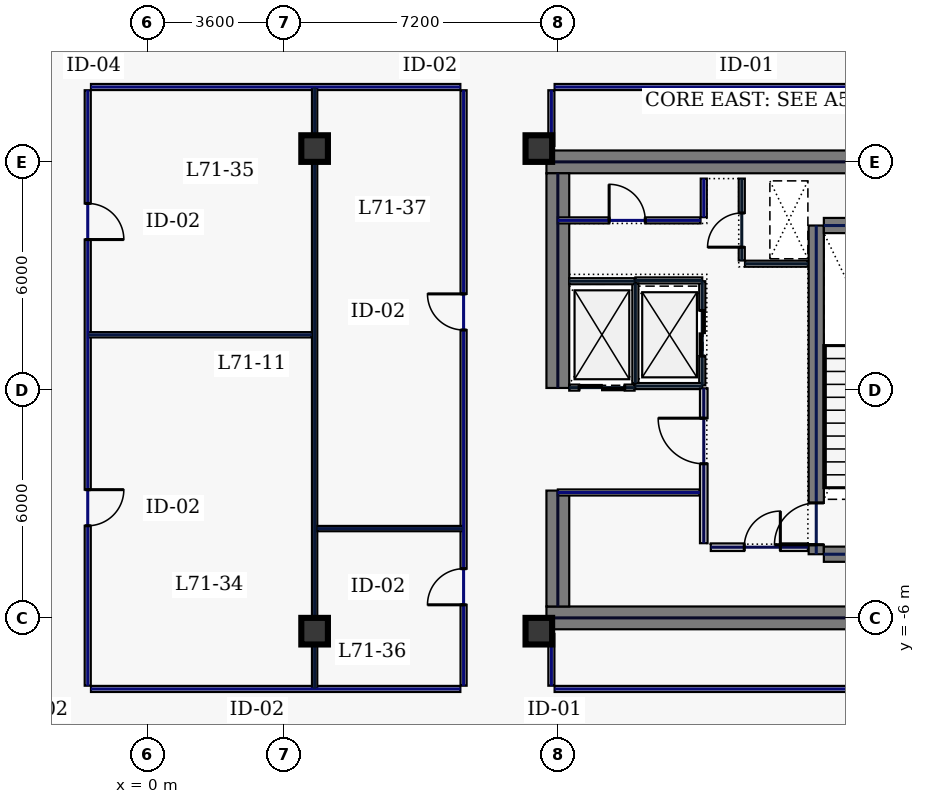
"""IFC4 building model, lengths in metres.
Left out: names, types, materials, properties, quantities, classifications, styles, units other than length and angle.
Written with IfcOpenShell. Run it as: python <this file> out.ifc"""

import sys

from ifc_helpers import new_model, si_unit, direction, frame, frame_2d, origin, origin_2d, place, context, subcontext, project, spatial, rectangle, hollow_rectangle, extrude, element, fill, save


model = new_model("IFC4")
c1 = context("Model", 3, precision=1e-05, world=origin(), true_north=direction((0.0, 1.0)))
c2 = subcontext(c1, "Body", "Model", "MODEL_VIEW")
j1 = project(units=[si_unit("LENGTHUNIT", "METRE"), si_unit("PLANEANGLEUNIT", "RADIAN")], contexts=[c1])
p1 = place(None, origin())
s1 = spatial("IfcSite", under=j1, at=p1, CompositionType="ELEMENT")
p2 = place(p1, origin())
s2 = spatial("IfcBuilding", under=s1, at=p2, CompositionType="ELEMENT")
p3 = place(p2, frame((0.0, 0.0, 305.0)))
s3 = spatial("IfcBuildingStorey", under=s2, at=p3, CompositionType="ELEMENT", Elevation=305.0)
for number, where, z_axis, x_axis in (
    (1, (10.5, 6.0, 0.0), (0.0, 0.0, 1.0), (1.0, 0.0, 0.0)),
    (2, (10.5, -6.0, 0.0), (0.0, 0.0, 1.0), (1.0, 0.0, 0.0)),
):
    element("IfcWall", number, at=place(p3, frame(where, z_axis=z_axis, x_axis=x_axis)), inside=s3, PredefinedType="SHEAR", context=c2, shape_type="SweptSolid", body=[
        extrude(rectangle(XDim=11.5, YDim=0.6, at=frame_2d((5.75, 0.0))), origin(), (0.0, 0.0, 1.0), 3.74),
    ])
p4 = place(p3, frame((10.8, -5.7, 0.0), z_axis=(0.0, 0.0, 1.0), x_axis=(0.0, 1.0, 0.0)))
e3 = element("IfcWall", 3, at=p4, inside=s3, PredefinedType="SHEAR", context=c2, shape_type="SweptSolid", body=[
    extrude(rectangle(XDim=3.05, YDim=0.6, at=frame_2d((1.525, 0.0))), origin(), (0.0, 0.0, 1.0), 3.74),
])
p5 = place(p3, frame((10.8, 0.05, 0.0), z_axis=(0.0, 0.0, 1.0), x_axis=(0.0, 1.0, 0.0)))
e4 = element("IfcWall", 4, at=p5, inside=s3, PredefinedType="SHEAR", context=c2, shape_type="SweptSolid", body=[
    extrude(rectangle(XDim=5.65, YDim=0.6, at=frame_2d((2.825, 0.0))), origin(), (0.0, 0.0, 1.0), 3.74),
])
p6 = place(p3, frame((17.6, -4.325, 0.0), z_axis=(0.0, 0.0, 1.0), x_axis=(0.0, 1.0, 0.0)))
e5 = element("IfcWall", 5, at=p6, inside=s3, PredefinedType="SHEAR", context=c2, shape_type="SweptSolid", body=[
    extrude(rectangle(XDim=8.65, YDim=0.4, at=frame_2d((4.325, 0.0))), origin(), (0.0, 0.0, 1.0), 3.74),
])
p7 = place(p6, frame((0.25, 0.0, 0.0)))
e6 = element("IfcOpeningElement", 6, at=p7, cuts=e5, PredefinedType="OPENING", context=c2, shape_type="SweptSolid", body=[
    extrude(rectangle(XDim=1.1, YDim=2.2, at=frame_2d((0.55, 1.1))), frame((0.0, 0.21, 0.0), z_axis=(0.0, -1.0, 0.0), x_axis=(1.0, 0.0, 0.0)), (0.0, 0.0, 1.0), 0.42),
])
for number, where, z_axis, x_axis in (
    (7, (17.8, -4.325, 0.0), (0.0, 0.0, 1.0), (1.0, 0.0, 0.0)),
    (8, (17.8, 4.325, 0.0), (0.0, 0.0, 1.0), (1.0, 0.0, 0.0)),
):
    element("IfcWall", number, at=place(p3, frame(where, z_axis=z_axis, x_axis=x_axis)), inside=s3, PredefinedType="SHEAR", context=c2, shape_type="SweptSolid", body=[
        extrude(rectangle(XDim=3.4, YDim=0.4, at=frame_2d((1.7, 0.0))), origin(), (0.0, 0.0, 1.0), 3.74),
    ])
for number, where, z_axis, x_axis in (
    (9, (10.3, -6.35, 0.0), (0.0, 0.0, 1.0), (1.0, 0.0, 0.0)),
    (10, (10.3, 6.35, 0.0), (0.0, 0.0, 1.0), (1.0, 0.0, 0.0)),
    (11, (4.4, -6.35, 0.0), (0.0, 0.0, 1.0), (1.0, 0.0, 0.0)),
    (12, (4.4, 6.35, 0.0), (0.0, 0.0, 1.0), (1.0, 0.0, 0.0)),
):
    element("IfcColumn", number, at=place(p3, frame(where, z_axis=z_axis, x_axis=x_axis)), inside=s3, PredefinedType="COLUMN", context=c2, shape_type="SweptSolid", body=[
        extrude(hollow_rectangle(XDim=0.7, YDim=0.7, WallThickness=0.032, at=origin_2d()), origin(), (0.0, 0.0, 1.0), 3.74),
    ])
p8 = place(p3, frame((14.6, 0.12, 0.0), z_axis=(0.0, 0.0, 1.0), x_axis=(0.0, 1.0, 0.0)))
e13 = element("IfcWall", 13, at=p8, inside=s3, PredefinedType="PARTITIONING", context=c2, shape_type="SweptSolid", body=[
    extrude(rectangle(XDim=2.74, YDim=0.16, at=frame_2d((1.37, 0.0))), origin(), (0.0, 0.0, 1.0), 3.74),
])
p9 = place(p8, frame((0.77, 0.0, 0.0)))
e14 = element("IfcOpeningElement", 14, at=p9, cuts=e13, PredefinedType="OPENING", context=c2, shape_type="SweptSolid", body=[
    extrude(rectangle(XDim=1.2, YDim=2.2, at=frame_2d((0.6, 1.1))), frame((0.0, 0.09, 0.0), z_axis=(0.0, -1.0, 0.0), x_axis=(1.0, 0.0, 0.0)), (0.0, 0.0, 1.0), 0.18),
])
for number, where, z_axis, x_axis in (
    (15, (12.84, 0.1, 0.0), (0.0, 0.0, 1.0), (1.0, 0.0, 0.0)),
    (16, (12.84, 2.88, 0.0), (0.0, 0.0, 1.0), (1.0, 0.0, 0.0)),
):
    element("IfcWall", number, at=place(p3, frame(where, z_axis=z_axis, x_axis=x_axis)), inside=s3, PredefinedType="PARTITIONING", context=c2, shape_type="SweptSolid", body=[
        extrude(rectangle(XDim=1.76, YDim=0.16, at=frame_2d((0.88, 0.0))), origin(), (0.0, 0.0, 1.0), 3.74),
    ])
p10 = place(p3, frame((12.84, 0.18, 0.0), z_axis=(0.0, 0.0, 1.0), x_axis=(0.0, 1.0, 0.0)))
e17 = element("IfcWall", 17, at=p10, inside=s3, PredefinedType="PARTITIONING", context=c2, shape_type="SweptSolid", body=[
    extrude(rectangle(XDim=2.62, YDim=0.16, at=frame_2d((1.31, 0.0))), origin(), (0.0, 0.0, 1.0), 3.74),
])
p11 = place(p3, frame((11.1, 0.06, 0.0), z_axis=(0.0, 0.0, 1.0), x_axis=(1.0, 0.0, 0.0)))
e18 = element("IfcWall", 18, at=p11, inside=s3, PredefinedType="PARTITIONING", context=c2, shape_type="SweptSolid", body=[
    extrude(rectangle(XDim=1.72, YDim=0.16, at=frame_2d((0.86, 0.0))), origin(), (0.0, 0.0, 1.0), 3.74),
])
p12 = place(p11, frame((0.26, 0.0, 0.0)))
e19 = element("IfcOpeningElement", 19, at=p12, cuts=e18, PredefinedType="OPENING", context=c2, shape_type="SweptSolid", body=[
    extrude(rectangle(XDim=1.2, YDim=2.2, at=frame_2d((0.6, 1.1))), frame((0.0, 0.09, 0.0), z_axis=(0.0, -1.0, 0.0), x_axis=(1.0, 0.0, 0.0)), (0.0, 0.0, 1.0), 0.18),
])
p13 = place(p3, frame((11.1, 2.86, 0.0), z_axis=(0.0, 0.0, 1.0), x_axis=(1.0, 0.0, 0.0)))
e20 = element("IfcWall", 20, at=p13, inside=s3, PredefinedType="PARTITIONING", context=c2, shape_type="SweptSolid", body=[
    extrude(rectangle(XDim=1.72, YDim=0.16, at=frame_2d((0.86, 0.0))), origin(), (0.0, 0.0, 1.0), 3.74),
])
p14 = place(p3, frame((15.64, 3.405, 0.0), z_axis=(0.0, 0.0, 1.0), x_axis=(0.0, 1.0, 0.0)))
e21 = element("IfcWall", 21, at=p14, inside=s3, PredefinedType="PARTITIONING", context=c2, shape_type="SweptSolid", body=[
    extrude(rectangle(XDim=2.155, YDim=0.16, at=frame_2d((1.078, 0.0))), origin(), (0.0, 0.0, 1.0), 3.74),
])
p15 = place(p14, frame((0.35, 0.0, 0.0)))
e22 = element("IfcOpeningElement", 22, at=p15, cuts=e21, PredefinedType="OPENING", context=c2, shape_type="SweptSolid", body=[
    extrude(rectangle(XDim=0.9, YDim=2.2, at=frame_2d((0.45, 1.1))), frame((0.0, 0.09, 0.0), z_axis=(0.0, -1.0, 0.0), x_axis=(1.0, 0.0, 0.0)), (0.0, 0.0, 1.0), 0.18),
])
p16 = place(p3, frame((15.725, 3.32, 0.0), z_axis=(0.0, 0.0, 1.0), x_axis=(1.0, 0.0, 0.0)))
e23 = element("IfcWall", 23, at=p16, inside=s3, PredefinedType="PARTITIONING", context=c2, shape_type="SweptSolid", body=[
    extrude(rectangle(XDim=1.655, YDim=0.16, at=frame_2d((0.827, 0.0))), origin(), (0.0, 0.0, 1.0), 3.74),
])
p17 = place(p3, frame((14.825, -4.14, 0.0), z_axis=(0.0, 0.0, 1.0), x_axis=(1.0, 0.0, 0.0)))
e24 = element("IfcWall", 24, at=p17, inside=s3, PredefinedType="SOLIDWALL", context=c2, shape_type="SweptSolid", body=[
    extrude(rectangle(XDim=2.555, YDim=0.2, at=frame_2d((1.277, 0.0))), origin(), (0.0, 0.0, 1.0), 3.74),
])
p18 = place(p17, frame((0.88, 0.0, 0.0)))
e25 = element("IfcOpeningElement", 25, at=p18, cuts=e24, PredefinedType="OPENING", context=c2, shape_type="SweptSolid", body=[
    extrude(rectangle(XDim=0.95, YDim=2.2, at=frame_2d((0.475, 1.1))), frame((0.0, 0.11, 0.0), z_axis=(0.0, -1.0, 0.0), x_axis=(1.0, 0.0, 0.0)), (0.0, 0.0, 1.0), 0.22),
])
p19 = place(p3, frame((10.8, -2.7, 0.0), z_axis=(0.0, 0.0, 1.0), x_axis=(1.0, 0.0, 0.0)))
e26 = element("IfcWall", 26, at=p19, inside=s3, PredefinedType="PARTITIONING", context=c2, shape_type="SweptSolid", body=[
    extrude(rectangle(XDim=3.735, YDim=0.16, at=frame_2d((1.867, 0.0))), origin(), (0.0, 0.0, 1.0), 3.74),
])
p20 = place(p3, frame((10.8, 4.46, 0.0), z_axis=(0.0, 0.0, 1.0), x_axis=(1.0, 0.0, 0.0)))
e27 = element("IfcWall", 27, at=p20, inside=s3, PredefinedType="PARTITIONING", context=c2, shape_type="SweptSolid", body=[
    extrude(rectangle(XDim=3.755, YDim=0.16, at=frame_2d((1.877, 0.0))), origin(), (0.0, 0.0, 1.0), 3.74),
])
p21 = place(p20, frame((1.35, 0.0, 0.0)))
e28 = element("IfcOpeningElement", 28, at=p21, cuts=e27, PredefinedType="OPENING", context=c2, shape_type="SweptSolid", body=[
    extrude(rectangle(XDim=0.95, YDim=2.2, at=frame_2d((0.475, 1.1))), frame((0.0, 0.09, 0.0), z_axis=(0.0, -1.0, 0.0), x_axis=(1.0, 0.0, 0.0)), (0.0, 0.0, 1.0), 0.18),
])
p22 = place(p3, frame((14.64, 4.545, 0.0), z_axis=(0.0, 0.0, 1.0), x_axis=(0.0, 1.0, 0.0)))
e29 = element("IfcWall", 29, at=p22, inside=s3, PredefinedType="PARTITIONING", context=c2, shape_type="SweptSolid", body=[
    extrude(rectangle(XDim=1.015, YDim=0.16, at=frame_2d((0.508, 0.0))), origin(), (0.0, 0.0, 1.0), 3.74),
])
p23 = place(p3, frame((14.64, -4.035, 0.0), z_axis=(0.0, 0.0, 1.0), x_axis=(0.0, 1.0, 0.0)))
e30 = element("IfcWall", 30, at=p23, inside=s3, PredefinedType="SOLIDWALL", context=c2, shape_type="SweptSolid", body=[
    extrude(rectangle(XDim=4.075, YDim=0.2, at=frame_2d((2.038, 0.0))), origin(), (0.0, 0.0, 1.0), 3.74),
])
p24 = place(p23, frame((2.09, 0.0, 0.0)))
e31 = element("IfcOpeningElement", 31, at=p24, cuts=e30, PredefinedType="OPENING", context=c2, shape_type="SweptSolid", body=[
    extrude(rectangle(XDim=1.2, YDim=2.2, at=frame_2d((0.6, 1.1))), frame((0.0, 0.11, 0.0), z_axis=(0.0, -1.0, 0.0), x_axis=(1.0, 0.0, 0.0)), (0.0, 0.0, 1.0), 0.22),
])
p25 = place(p3, frame((21.915, 7.97, 0.0), z_axis=(0.0, 0.0, 1.0), x_axis=(-1.0, 0.0, 0.0)))
e32 = element("IfcWall", 32, at=p25, inside=s3, PredefinedType="PARTITIONING", context=c2, shape_type="SweptSolid", body=[
    extrude(rectangle(XDim=11.2, YDim=0.16, at=frame_2d((5.6, 0.0))), origin(), (0.0, 0.0, 1.0), 3.74),
])
p26 = place(p3, frame((10.63, 7.885, 0.0), z_axis=(0.0, 0.0, 1.0), x_axis=(0.0, -1.0, 0.0)))
e33 = element("IfcWall", 33, at=p26, inside=s3, PredefinedType="PARTITIONING", context=c2, shape_type="SweptSolid", body=[
    extrude(rectangle(XDim=1.465, YDim=0.16, at=frame_2d((0.732, 0.0))), origin(), (0.0, 0.0, 1.0), 3.74),
])
p27 = place(p3, frame((10.63, -6.42, 0.0), z_axis=(0.0, 0.0, 1.0), x_axis=(0.0, -1.0, 0.0)))
e34 = element("IfcWall", 34, at=p27, inside=s3, PredefinedType="PARTITIONING", context=c2, shape_type="SweptSolid", body=[
    extrude(rectangle(XDim=1.365, YDim=0.16, at=frame_2d((0.683, 0.0))), origin(), (0.0, 0.0, 1.0), 3.74),
])
p28 = place(p3, frame((10.715, -7.87, 0.0), z_axis=(0.0, 0.0, 1.0), x_axis=(1.0, 0.0, 0.0)))
e35 = element("IfcWall", 35, at=p28, inside=s3, PredefinedType="PARTITIONING", context=c2, shape_type="SweptSolid", body=[
    extrude(rectangle(XDim=11.2, YDim=0.16, at=frame_2d((5.6, 0.0))), origin(), (0.0, 0.0, 1.0), 3.74),
])
p29 = place(p3, frame((8.235, 7.97, 0.0), z_axis=(0.0, 0.0, 1.0), x_axis=(-1.0, 0.0, 0.0)))
e36 = element("IfcWall", 36, at=p29, inside=s3, PredefinedType="PARTITIONING", context=c2, shape_type="SweptSolid", body=[
    extrude(rectangle(XDim=9.72, YDim=0.16, at=frame_2d((4.86, 0.0))), origin(), (0.0, 0.0, 1.0), 3.74),
])
p30 = place(p3, frame((-1.57, 7.885, 0.0), z_axis=(0.0, 0.0, 1.0), x_axis=(0.0, -1.0, 0.0)))
e37 = element("IfcWall", 37, at=p30, inside=s3, PredefinedType="PARTITIONING", context=c2, shape_type="SweptSolid", body=[
    extrude(rectangle(XDim=15.67, YDim=0.16, at=frame_2d((7.835, 0.0))), origin(), (0.0, 0.0, 1.0), 3.74),
])
p31 = place(p30, frame((10.511, 0.0, 0.0)))
e38 = element("IfcOpeningElement", 38, at=p31, cuts=e37, PredefinedType="OPENING", context=c2, shape_type="SweptSolid", body=[
    extrude(rectangle(XDim=0.95, YDim=2.2, at=frame_2d((0.475, 1.1))), frame((0.0, 0.09, 0.0), z_axis=(0.0, -1.0, 0.0), x_axis=(1.0, 0.0, 0.0)), (0.0, 0.0, 1.0), 0.18),
])
p32 = place(p30, frame((2.979, 0.0, 0.0)))
e39 = element("IfcOpeningElement", 39, at=p32, cuts=e37, PredefinedType="OPENING", context=c2, shape_type="SweptSolid", body=[
    extrude(rectangle(XDim=0.95, YDim=2.2, at=frame_2d((0.475, 1.1))), frame((0.0, 0.09, 0.0), z_axis=(0.0, -1.0, 0.0), x_axis=(1.0, 0.0, 0.0)), (0.0, 0.0, 1.0), 0.18),
])
p33 = place(p3, frame((-1.485, -7.87, 0.0), z_axis=(0.0, 0.0, 1.0), x_axis=(1.0, 0.0, 0.0)))
e40 = element("IfcWall", 40, at=p33, inside=s3, PredefinedType="PARTITIONING", context=c2, shape_type="SweptSolid", body=[
    extrude(rectangle(XDim=9.72, YDim=0.16, at=frame_2d((4.86, 0.0))), origin(), (0.0, 0.0, 1.0), 3.74),
])
p34 = place(p3, frame((8.32, -7.785, 0.0), z_axis=(0.0, 0.0, 1.0), x_axis=(0.0, 1.0, 0.0)))
e41 = element("IfcWall", 41, at=p34, inside=s3, PredefinedType="PARTITIONING", context=c2, shape_type="SweptSolid", body=[
    extrude(rectangle(XDim=15.67, YDim=0.16, at=frame_2d((7.835, 0.0))), origin(), (0.0, 0.0, 1.0), 3.74),
])
p35 = place(p34, frame((2.129, 0.0, 0.0)))
e42 = element("IfcOpeningElement", 42, at=p35, cuts=e41, PredefinedType="OPENING", context=c2, shape_type="SweptSolid", body=[
    extrude(rectangle(XDim=0.95, YDim=2.2, at=frame_2d((0.475, 1.1))), frame((0.0, 0.09, 0.0), z_axis=(0.0, -1.0, 0.0), x_axis=(1.0, 0.0, 0.0)), (0.0, 0.0, 1.0), 0.18),
])
p36 = place(p34, frame((9.361, 0.0, 0.0)))
e43 = element("IfcOpeningElement", 43, at=p36, cuts=e41, PredefinedType="OPENING", context=c2, shape_type="SweptSolid", body=[
    extrude(rectangle(XDim=0.95, YDim=2.2, at=frame_2d((0.475, 1.1))), frame((0.0, 0.09, 0.0), z_axis=(0.0, -1.0, 0.0), x_axis=(1.0, 0.0, 0.0)), (0.0, 0.0, 1.0), 0.18),
])
p37 = place(p3, frame((4.4, -7.865, 0.0), z_axis=(0.0, 0.0, 1.0), x_axis=(0.0, 1.0, 0.0)))
e44 = element("IfcWall", 44, at=p37, inside=s3, PredefinedType="PARTITIONING", context=c2, shape_type="SweptSolid", body=[
    extrude(rectangle(XDim=15.83, YDim=0.14, at=frame_2d((7.915, 0.0))), origin(), (0.0, 0.0, 1.0), 1.535),
])
p38 = place(p3, frame((-1.565, 1.45, 0.0), z_axis=(0.0, 0.0, 1.0), x_axis=(1.0, 0.0, 0.0)))
e45 = element("IfcWall", 45, at=p38, inside=s3, PredefinedType="PARTITIONING", context=c2, shape_type="SweptSolid", body=[
    extrude(rectangle(XDim=5.89, YDim=0.14, at=frame_2d((2.945, 0.0))), origin(), (0.0, 0.0, 1.0), 3.74),
])
p39 = place(p3, frame((4.475, -3.65, 0.0), z_axis=(0.0, 0.0, 1.0), x_axis=(1.0, 0.0, 0.0)))
e46 = element("IfcWall", 46, at=p39, inside=s3, PredefinedType="PARTITIONING", context=c2, shape_type="SweptSolid", body=[
    extrude(rectangle(XDim=3.84, YDim=0.14, at=frame_2d((1.92, 0.0))), origin(), (0.0, 0.0, 1.0), 3.74),
])
p40 = place(p7, origin())
e47 = element("IfcDoor", 47, at=p40, inside=s3, OperationType="SINGLE_SWING_LEFT", PredefinedType="DOOR", context=c2, shape_type="SweptSolid", body=[
    extrude(rectangle(XDim=1.1, YDim=2.2, at=frame_2d((0.55, 1.1))), frame((0.0, 0.025, 0.0), z_axis=(0.0, -1.0, 0.0), x_axis=(1.0, 0.0, 0.0)), (0.0, 0.0, 1.0), 0.05),
])
fill(e6, e47)
p41 = place(p9, origin())
e48 = element("IfcDoor", 48, at=p41, inside=s3, OperationType="SLIDING_TO_LEFT", PredefinedType="DOOR", context=c2, shape_type="SweptSolid", body=[
    extrude(rectangle(XDim=1.2, YDim=2.2, at=frame_2d((0.6, 1.1))), frame((0.0, 0.025, 0.0), z_axis=(0.0, -1.0, 0.0), x_axis=(1.0, 0.0, 0.0)), (0.0, 0.0, 1.0), 0.05),
])
fill(e14, e48)
p42 = place(p12, origin())
e49 = element("IfcDoor", 49, at=p42, inside=s3, OperationType="SLIDING_TO_LEFT", PredefinedType="DOOR", context=c2, shape_type="SweptSolid", body=[
    extrude(rectangle(XDim=1.2, YDim=2.2, at=frame_2d((0.6, 1.1))), frame((0.0, 0.025, 0.0), z_axis=(0.0, -1.0, 0.0), x_axis=(1.0, 0.0, 0.0)), (0.0, 0.0, 1.0), 0.05),
])
fill(e19, e49)
p43 = place(p15, origin())
e50 = element("IfcDoor", 50, at=p43, inside=s3, OperationType="SINGLE_SWING_LEFT", PredefinedType="DOOR", context=c2, shape_type="SweptSolid", body=[
    extrude(rectangle(XDim=0.9, YDim=2.2, at=frame_2d((0.45, 1.1))), frame((0.0, 0.025, 0.0), z_axis=(0.0, -1.0, 0.0), x_axis=(1.0, 0.0, 0.0)), (0.0, 0.0, 1.0), 0.05),
])
fill(e22, e50)
p44 = place(p18, origin())
e51 = element("IfcDoor", 51, at=p44, inside=s3, OperationType="SINGLE_SWING_RIGHT", PredefinedType="DOOR", context=c2, shape_type="SweptSolid", body=[
    extrude(rectangle(XDim=0.95, YDim=2.2, at=frame_2d((0.475, 1.1))), frame((0.0, 0.025, 0.0), z_axis=(0.0, -1.0, 0.0), x_axis=(1.0, 0.0, 0.0)), (0.0, 0.0, 1.0), 0.05),
])
fill(e25, e51)
p45 = place(p21, origin())
e52 = element("IfcDoor", 52, at=p45, inside=s3, OperationType="SINGLE_SWING_LEFT", PredefinedType="DOOR", context=c2, shape_type="SweptSolid", body=[
    extrude(rectangle(XDim=0.95, YDim=2.2, at=frame_2d((0.475, 1.1))), frame((0.0, 0.025, 0.0), z_axis=(0.0, -1.0, 0.0), x_axis=(1.0, 0.0, 0.0)), (0.0, 0.0, 1.0), 0.05),
])
fill(e28, e52)
p46 = place(p24, origin())
e53 = element("IfcDoor", 53, at=p46, inside=s3, OperationType="SINGLE_SWING_RIGHT", PredefinedType="DOOR", context=c2, shape_type="SweptSolid", body=[
    extrude(rectangle(XDim=1.2, YDim=2.2, at=frame_2d((0.6, 1.1))), frame((0.0, 0.025, 0.0), z_axis=(0.0, -1.0, 0.0), x_axis=(1.0, 0.0, 0.0)), (0.0, 0.0, 1.0), 0.05),
])
fill(e31, e53)
p47 = place(p31, origin())
e54 = element("IfcDoor", 54, at=p47, inside=s3, OperationType="SINGLE_SWING_LEFT", PredefinedType="DOOR", context=c2, shape_type="SweptSolid", body=[
    extrude(rectangle(XDim=0.95, YDim=2.2, at=frame_2d((0.475, 1.1))), frame((0.0, 0.025, 0.0), z_axis=(0.0, -1.0, 0.0), x_axis=(1.0, 0.0, 0.0)), (0.0, 0.0, 1.0), 0.05),
])
fill(e38, e54)
p48 = place(p32, origin())
e55 = element("IfcDoor", 55, at=p48, inside=s3, OperationType="SINGLE_SWING_RIGHT", PredefinedType="DOOR", context=c2, shape_type="SweptSolid", body=[
    extrude(rectangle(XDim=0.95, YDim=2.2, at=frame_2d((0.475, 1.1))), frame((0.0, 0.025, 0.0), z_axis=(0.0, -1.0, 0.0), x_axis=(1.0, 0.0, 0.0)), (0.0, 0.0, 1.0), 0.05),
])
fill(e39, e55)
p49 = place(p35, origin())
e56 = element("IfcDoor", 56, at=p49, inside=s3, OperationType="SINGLE_SWING_LEFT", PredefinedType="DOOR", context=c2, shape_type="SweptSolid", body=[
    extrude(rectangle(XDim=0.95, YDim=2.2, at=frame_2d((0.475, 1.1))), frame((0.0, 0.025, 0.0), z_axis=(0.0, -1.0, 0.0), x_axis=(1.0, 0.0, 0.0)), (0.0, 0.0, 1.0), 0.05),
])
fill(e42, e56)
p50 = place(p36, origin())
e57 = element("IfcDoor", 57, at=p50, inside=s3, OperationType="SINGLE_SWING_RIGHT", PredefinedType="DOOR", context=c2, shape_type="SweptSolid", body=[
    extrude(rectangle(XDim=0.95, YDim=2.2, at=frame_2d((0.475, 1.1))), frame((0.0, 0.025, 0.0), z_axis=(0.0, -1.0, 0.0), x_axis=(1.0, 0.0, 0.0)), (0.0, 0.0, 1.0), 0.05),
])
fill(e43, e57)
save(model, sys.argv[1])
